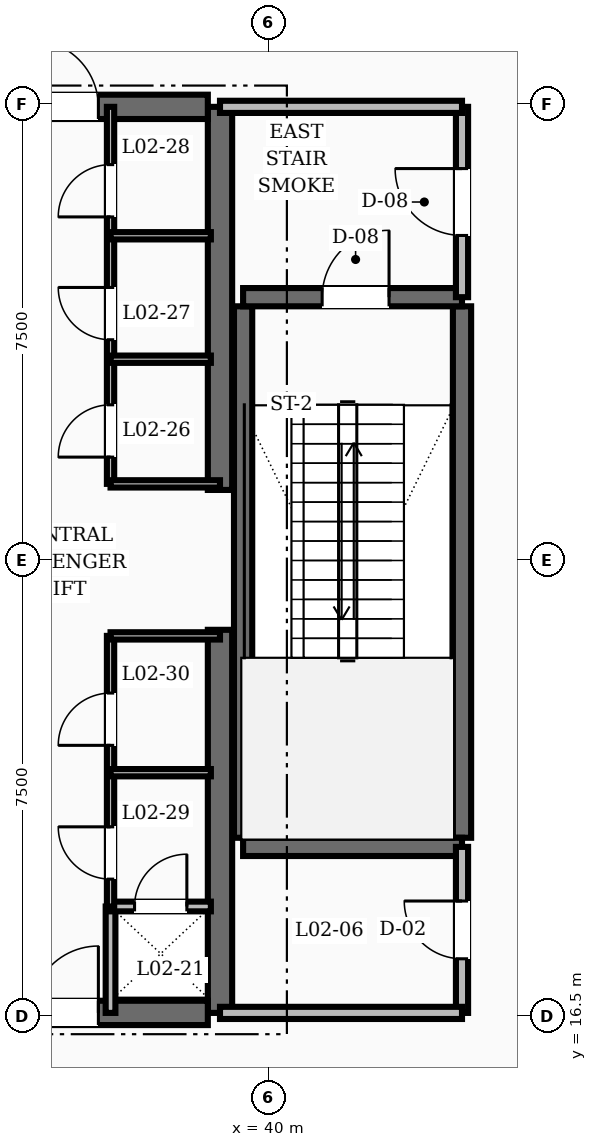
"""IFC4 building model, lengths in metres.
Left out: names, types, materials, properties, quantities, classifications, styles, units other than length and angle.
Written with IfcOpenShell. Run it as: python <this file> out.ifc"""

import sys

from ifc_helpers import new_model, si_unit, direction, frame, frame_2d, origin, place, context, subcontext, project, spatial, rectangle, extrude, element, fill, save


model = new_model("IFC4")
c1 = context("Model", 3, precision=1e-05, world=origin(), true_north=direction((0.0, 1.0)))
c2 = subcontext(c1, "Body", "Model", "MODEL_VIEW")
j1 = project(units=[si_unit("LENGTHUNIT", "METRE"), si_unit("PLANEANGLEUNIT", "RADIAN")], contexts=[c1])
p1 = place(None, origin())
s1 = spatial("IfcSite", under=j1, at=p1, CompositionType="ELEMENT")
p2 = place(p1, origin())
s2 = spatial("IfcBuilding", under=s1, at=p2, CompositionType="ELEMENT")
p3 = place(p2, frame((0.0, 0.0, 10.0)))
s3 = spatial("IfcBuildingStorey", under=s2, at=p3, CompositionType="ELEMENT", Elevation=10.0)
for number, where, z_axis, x_axis in (
    (1, (39.2, 16.55, 0.0), (0.0, 0.0, 1.0), (0.0, 1.0, 0.0)),
    (2, (39.2, 25.15, 0.0), (0.0, 0.0, 1.0), (0.0, 1.0, 0.0)),
):
    element("IfcWall", number, at=place(p3, frame(where, z_axis=z_axis, x_axis=x_axis)), inside=s3, PredefinedType="SHEAR", context=c2, shape_type="SweptSolid", body=[
        extrude(rectangle(XDim=6.3, YDim=0.4, at=frame_2d((3.15, 0.0))), origin(), (0.0, 0.0, 1.0), 4.8),
    ])
p4 = place(p3, frame((35.8, 16.55, 0.0), z_axis=(0.0, 0.0, 1.0), x_axis=(1.0, 0.0, 0.0)))
e3 = element("IfcWall", 3, at=p4, inside=s3, PredefinedType="SHEAR", context=c2, shape_type="SweptSolid", body=[
    extrude(rectangle(XDim=3.2, YDim=0.4, at=frame_2d((1.6, 0.0))), origin(), (0.0, 0.0, 1.0), 4.8),
])
p5 = place(p4, frame((0.3, 0.0, 0.0)))
e4 = element("IfcOpeningElement", 4, at=p5, cuts=e3, PredefinedType="OPENING", context=c2, shape_type="SweptSolid", body=[
    extrude(rectangle(XDim=1.1, YDim=2.1, at=frame_2d((0.55, 1.05))), frame((0.0, 0.21, 0.0), z_axis=(0.0, -1.0, 0.0), x_axis=(1.0, 0.0, 0.0)), (0.0, 0.0, 1.0), 0.42),
])
p6 = place(p3, frame((35.8, 31.45, 0.0), z_axis=(0.0, 0.0, 1.0), x_axis=(1.0, 0.0, 0.0)))
e5 = element("IfcWall", 5, at=p6, inside=s3, PredefinedType="SHEAR", context=c2, shape_type="SweptSolid", body=[
    extrude(rectangle(XDim=3.2, YDim=0.4, at=frame_2d((1.6, 0.0))), origin(), (0.0, 0.0, 1.0), 4.8),
])
p7 = place(p6, frame((0.3, 0.0, 0.0)))
e6 = element("IfcOpeningElement", 6, at=p7, cuts=e5, PredefinedType="OPENING", context=c2, shape_type="SweptSolid", body=[
    extrude(rectangle(XDim=1.1, YDim=2.1, at=frame_2d((0.55, 1.05))), frame((0.0, 0.21, 0.0), z_axis=(0.0, -1.0, 0.0), x_axis=(1.0, 0.0, 0.0)), (0.0, 0.0, 1.0), 0.42),
])
for number, where, z_axis, x_axis in (
    (7, (43.18, 19.43, 0.0), (0.0, 0.0, 1.0), (0.0, 1.0, 0.0)),
    (8, (39.58, 19.43, 0.0), (0.0, 0.0, 1.0), (0.0, 1.0, 0.0)),
):
    element("IfcWall", number, at=place(p3, frame(where, z_axis=z_axis, x_axis=x_axis)), inside=s3, PredefinedType="SHEAR", context=c2, shape_type="SweptSolid", body=[
        extrude(rectangle(XDim=8.74, YDim=0.3, at=frame_2d((4.37, 0.0))), origin(), (0.0, 0.0, 1.0), 4.8),
    ])
p8 = place(p3, frame((39.58, 19.28, 0.0), z_axis=(0.0, 0.0, 1.0), x_axis=(1.0, 0.0, 0.0)))
e9 = element("IfcWall", 9, at=p8, inside=s3, PredefinedType="SHEAR", context=c2, shape_type="SweptSolid", body=[
    extrude(rectangle(XDim=3.6, YDim=0.3, at=frame_2d((1.8, 0.0))), origin(), (0.0, 0.0, 1.0), 4.8),
])
p9 = place(p3, frame((39.58, 28.32, 0.0), z_axis=(0.0, 0.0, 1.0), x_axis=(1.0, 0.0, 0.0)))
e10 = element("IfcWall", 10, at=p9, inside=s3, PredefinedType="SHEAR", context=c2, shape_type="SweptSolid", body=[
    extrude(rectangle(XDim=3.6, YDim=0.3, at=frame_2d((1.8, 0.0))), origin(), (0.0, 0.0, 1.0), 4.8),
])
p10 = place(p9, frame((1.3, 0.0, 0.0)))
e11 = element("IfcOpeningElement", 11, at=p10, cuts=e10, PredefinedType="OPENING", context=c2, shape_type="SweptSolid", body=[
    extrude(rectangle(XDim=1.1, YDim=2.1, at=frame_2d((0.55, 1.05))), frame((0.0, 0.16, 0.0), z_axis=(0.0, -1.0, 0.0), x_axis=(1.0, 0.0, 0.0)), (0.0, 0.0, 1.0), 0.32),
])
p11 = place(p3, frame((43.18, 28.32, 0.0), z_axis=(0.0, 0.0, 1.0), x_axis=(0.0, 1.0, 0.0)))
e12 = element("IfcWall", 12, at=p11, inside=s3, PredefinedType="SOLIDWALL", context=c2, shape_type="SweptSolid", body=[
    extrude(rectangle(XDim=3.13, YDim=0.2, at=frame_2d((1.565, 0.0))), origin(), (0.0, 0.0, 1.0), 3.52),
])
p12 = place(p11, frame((1.015, 0.0, 0.0)))
e13 = element("IfcOpeningElement", 13, at=p12, cuts=e12, PredefinedType="OPENING", context=c2, shape_type="SweptSolid", body=[
    extrude(rectangle(XDim=1.1, YDim=2.1, at=frame_2d((0.55, 1.05))), frame((0.0, 0.11, 0.0), z_axis=(0.0, -1.0, 0.0), x_axis=(1.0, 0.0, 0.0)), (0.0, 0.0, 1.0), 0.22),
])
p13 = place(p3, frame((39.2, 31.45, 0.0), z_axis=(0.0, 0.0, 1.0), x_axis=(1.0, 0.0, 0.0)))
e14 = element("IfcWall", 14, at=p13, inside=s3, PredefinedType="SOLIDWALL", context=c2, shape_type="SweptSolid", body=[
    extrude(rectangle(XDim=3.98, YDim=0.2, at=frame_2d((1.99, 0.0))), origin(), (0.0, 0.0, 1.0), 3.52),
])
p14 = place(p3, frame((43.18, 16.55, 0.0), z_axis=(0.0, 0.0, 1.0), x_axis=(0.0, 1.0, 0.0)))
e15 = element("IfcWall", 15, at=p14, inside=s3, PredefinedType="SOLIDWALL", context=c2, shape_type="SweptSolid", body=[
    extrude(rectangle(XDim=2.73, YDim=0.2, at=frame_2d((1.365, 0.0))), origin(), (0.0, 0.0, 1.0), 3.52),
])
p15 = place(p14, frame((0.89, 0.0, 0.0)))
e16 = element("IfcOpeningElement", 16, at=p15, cuts=e15, PredefinedType="OPENING", context=c2, shape_type="SweptSolid", body=[
    extrude(rectangle(XDim=0.95, YDim=2.1, at=frame_2d((0.475, 1.05))), frame((0.0, 0.11, 0.0), z_axis=(0.0, -1.0, 0.0), x_axis=(1.0, 0.0, 0.0)), (0.0, 0.0, 1.0), 0.22),
])
p16 = place(p3, frame((39.2, 16.55, 0.0), z_axis=(0.0, 0.0, 1.0), x_axis=(1.0, 0.0, 0.0)))
e17 = element("IfcWall", 17, at=p16, inside=s3, PredefinedType="SOLIDWALL", context=c2, shape_type="SweptSolid", body=[
    extrude(rectangle(XDim=3.98, YDim=0.2, at=frame_2d((1.99, 0.0))), origin(), (0.0, 0.0, 1.0), 3.52),
])
p17 = place(p3, frame((37.4, 16.55, 0.0), z_axis=(0.0, 0.0, 1.0), x_axis=(0.0, 1.0, 0.0)))
e18 = element("IfcWall", 18, at=p17, inside=s3, PredefinedType="SOLIDWALL", context=c2, shape_type="SweptSolid", body=[
    extrude(rectangle(XDim=1.75, YDim=0.16, at=frame_2d((0.875, 0.0))), origin(), (0.0, 0.0, 1.0), 3.52),
])
p18 = place(p3, frame((37.4, 18.3, 0.0), z_axis=(0.0, 0.0, 1.0), x_axis=(1.0, 0.0, 0.0)))
e19 = element("IfcWall", 19, at=p18, inside=s3, PredefinedType="SOLIDWALL", context=c2, shape_type="SweptSolid", body=[
    extrude(rectangle(XDim=1.65, YDim=0.16, at=frame_2d((0.825, 0.0))), origin(), (0.0, 0.0, 1.0), 3.52),
])
p19 = place(p18, frame((0.395, 0.0, 0.0)))
e20 = element("IfcOpeningElement", 20, at=p19, cuts=e19, PredefinedType="OPENING", context=c2, shape_type="SweptSolid", body=[
    extrude(rectangle(XDim=0.86, YDim=2.1, at=frame_2d((0.43, 1.05))), frame((0.0, 0.09, 0.0), z_axis=(0.0, -1.0, 0.0), x_axis=(1.0, 0.0, 0.0)), (0.0, 0.0, 1.0), 0.18),
])
p20 = place(p3, frame((37.4, 25.25, 0.0), z_axis=(0.0, 0.0, 1.0), x_axis=(0.0, 1.0, 0.0)))
e21 = element("IfcWall", 21, at=p20, inside=s3, PredefinedType="PARTITIONING", context=c2, shape_type="SweptSolid", body=[
    extrude(rectangle(XDim=6.2, YDim=0.12, at=frame_2d((3.1, 0.0))), origin(), (0.0, 0.0, 1.0), 3.52),
])
p21 = place(p20, frame((0.44, 0.0, 0.0)))
e22 = element("IfcOpeningElement", 22, at=p21, cuts=e21, PredefinedType="OPENING", context=c2, shape_type="SweptSolid", body=[
    extrude(rectangle(XDim=0.86, YDim=2.1, at=frame_2d((0.43, 1.05))), frame((0.0, 0.07, 0.0), z_axis=(0.0, -1.0, 0.0), x_axis=(1.0, 0.0, 0.0)), (0.0, 0.0, 1.0), 0.14),
])
p22 = place(p20, frame((2.37, 0.0, 0.0)))
e23 = element("IfcOpeningElement", 23, at=p22, cuts=e21, PredefinedType="OPENING", context=c2, shape_type="SweptSolid", body=[
    extrude(rectangle(XDim=0.86, YDim=2.1, at=frame_2d((0.43, 1.05))), frame((0.0, 0.07, 0.0), z_axis=(0.0, -1.0, 0.0), x_axis=(1.0, 0.0, 0.0)), (0.0, 0.0, 1.0), 0.14),
])
p23 = place(p20, frame((4.39, 0.0, 0.0)))
e24 = element("IfcOpeningElement", 24, at=p23, cuts=e21, PredefinedType="OPENING", context=c2, shape_type="SweptSolid", body=[
    extrude(rectangle(XDim=0.86, YDim=2.1, at=frame_2d((0.43, 1.05))), frame((0.0, 0.07, 0.0), z_axis=(0.0, -1.0, 0.0), x_axis=(1.0, 0.0, 0.0)), (0.0, 0.0, 1.0), 0.14),
])
p24 = place(p3, frame((37.4, 25.25, 0.0), z_axis=(0.0, 0.0, 1.0), x_axis=(1.0, 0.0, 0.0)))
e25 = element("IfcWall", 25, at=p24, inside=s3, PredefinedType="PARTITIONING", context=c2, shape_type="SweptSolid", body=[
    extrude(rectangle(XDim=1.8, YDim=0.12, at=frame_2d((0.9, 0.0))), origin(), (0.0, 0.0, 1.0), 3.52),
])
p25 = place(p3, frame((37.4, 18.3, 0.0), z_axis=(0.0, 0.0, 1.0), x_axis=(0.0, 1.0, 0.0)))
e26 = element("IfcWall", 26, at=p25, inside=s3, PredefinedType="PARTITIONING", context=c2, shape_type="SweptSolid", body=[
    extrude(rectangle(XDim=4.45, YDim=0.12, at=frame_2d((2.225, 0.0))), origin(), (0.0, 0.0, 1.0), 3.52),
])
p26 = place(p25, frame((0.45, 0.0, 0.0)))
e27 = element("IfcOpeningElement", 27, at=p26, cuts=e26, PredefinedType="OPENING", context=c2, shape_type="SweptSolid", body=[
    extrude(rectangle(XDim=0.86, YDim=2.1, at=frame_2d((0.43, 1.05))), frame((0.0, 0.07, 0.0), z_axis=(0.0, -1.0, 0.0), x_axis=(1.0, 0.0, 0.0)), (0.0, 0.0, 1.0), 0.14),
])
p27 = place(p25, frame((2.65, 0.0, 0.0)))
e28 = element("IfcOpeningElement", 28, at=p27, cuts=e26, PredefinedType="OPENING", context=c2, shape_type="SweptSolid", body=[
    extrude(rectangle(XDim=0.86, YDim=2.1, at=frame_2d((0.43, 1.05))), frame((0.0, 0.07, 0.0), z_axis=(0.0, -1.0, 0.0), x_axis=(1.0, 0.0, 0.0)), (0.0, 0.0, 1.0), 0.14),
])
p28 = place(p3, frame((37.4, 22.75, 0.0), z_axis=(0.0, 0.0, 1.0), x_axis=(1.0, 0.0, 0.0)))
e29 = element("IfcWall", 29, at=p28, inside=s3, PredefinedType="PARTITIONING", context=c2, shape_type="SweptSolid", body=[
    extrude(rectangle(XDim=1.8, YDim=0.12, at=frame_2d((0.9, 0.0))), origin(), (0.0, 0.0, 1.0), 3.52),
])
for number, where, z_axis, x_axis in (
    (30, (37.4, 27.3, 0.0), (0.0, 0.0, 1.0), (1.0, 0.0, 0.0)),
    (31, (37.4, 29.33, 0.0), (0.0, 0.0, 1.0), (1.0, 0.0, 0.0)),
    (32, (37.4, 20.5, 0.0), (0.0, 0.0, 1.0), (1.0, 0.0, 0.0)),
):
    element("IfcWall", number, at=place(p3, frame(where, z_axis=z_axis, x_axis=x_axis)), inside=s3, PredefinedType="PARTITIONING", context=c2, shape_type="SweptSolid", body=[
        extrude(rectangle(XDim=1.65, YDim=0.12, at=frame_2d((0.825, 0.0))), origin(), (0.0, 0.0, 1.0), 3.52),
    ])
p29 = place(p10, origin())
e33 = element("IfcDoor", 33, at=p29, inside=s3, OperationType="SINGLE_SWING_RIGHT", PredefinedType="DOOR", context=c2, shape_type="SweptSolid", body=[
    extrude(rectangle(XDim=1.1, YDim=2.1, at=frame_2d((0.55, 1.05))), frame((0.0, 0.025, 0.0), z_axis=(0.0, -1.0, 0.0), x_axis=(1.0, 0.0, 0.0)), (0.0, 0.0, 1.0), 0.05),
])
fill(e11, e33)
p30 = place(p12, origin())
e34 = element("IfcDoor", 34, at=p30, inside=s3, OperationType="SINGLE_SWING_RIGHT", PredefinedType="DOOR", context=c2, shape_type="SweptSolid", body=[
    extrude(rectangle(XDim=1.1, YDim=2.1, at=frame_2d((0.55, 1.05))), frame((0.0, 0.025, 0.0), z_axis=(0.0, -1.0, 0.0), x_axis=(1.0, 0.0, 0.0)), (0.0, 0.0, 1.0), 0.05),
])
fill(e13, e34)
p31 = place(p15, origin())
e35 = element("IfcDoor", 35, at=p31, inside=s3, OperationType="SINGLE_SWING_RIGHT", PredefinedType="DOOR", context=c2, shape_type="SweptSolid", body=[
    extrude(rectangle(XDim=0.95, YDim=2.1, at=frame_2d((0.475, 1.05))), frame((0.0, 0.025, 0.0), z_axis=(0.0, -1.0, 0.0), x_axis=(1.0, 0.0, 0.0)), (0.0, 0.0, 1.0), 0.05),
])
fill(e16, e35)
p32 = place(p7, origin())
e36 = element("IfcDoor", 36, at=p32, inside=s3, OperationType="SINGLE_SWING_LEFT", PredefinedType="DOOR", context=c2, shape_type="SweptSolid", body=[
    extrude(rectangle(XDim=1.1, YDim=2.1, at=frame_2d((0.55, 1.05))), frame((0.0, 0.025, 0.0), z_axis=(0.0, -1.0, 0.0), x_axis=(1.0, 0.0, 0.0)), (0.0, 0.0, 1.0), 0.05),
])
fill(e6, e36)
p33 = place(p5, origin())
e37 = element("IfcDoor", 37, at=p33, inside=s3, OperationType="SINGLE_SWING_RIGHT", PredefinedType="DOOR", context=c2, shape_type="SweptSolid", body=[
    extrude(rectangle(XDim=1.1, YDim=2.1, at=frame_2d((0.55, 1.05))), frame((0.0, 0.025, 0.0), z_axis=(0.0, -1.0, 0.0), x_axis=(1.0, 0.0, 0.0)), (0.0, 0.0, 1.0), 0.05),
])
fill(e4, e37)
p34 = place(p19, origin())
e38 = element("IfcDoor", 38, at=p34, inside=s3, OperationType="SINGLE_SWING_RIGHT", PredefinedType="TRAPDOOR", context=c2, shape_type="SweptSolid", body=[
    extrude(rectangle(XDim=0.86, YDim=2.1, at=frame_2d((0.43, 1.05))), frame((0.0, 0.025, 0.0), z_axis=(0.0, -1.0, 0.0), x_axis=(1.0, 0.0, 0.0)), (0.0, 0.0, 1.0), 0.05),
])
fill(e20, e38)
p35 = place(p21, origin())
e39 = element("IfcDoor", 39, at=p35, inside=s3, OperationType="SINGLE_SWING_LEFT", PredefinedType="DOOR", context=c2, shape_type="SweptSolid", body=[
    extrude(rectangle(XDim=0.86, YDim=2.1, at=frame_2d((0.43, 1.05))), frame((0.0, 0.025, 0.0), z_axis=(0.0, -1.0, 0.0), x_axis=(1.0, 0.0, 0.0)), (0.0, 0.0, 1.0), 0.05),
])
fill(e22, e39)
p36 = place(p22, origin())
e40 = element("IfcDoor", 40, at=p36, inside=s3, OperationType="SINGLE_SWING_RIGHT", PredefinedType="DOOR", context=c2, shape_type="SweptSolid", body=[
    extrude(rectangle(XDim=0.86, YDim=2.1, at=frame_2d((0.43, 1.05))), frame((0.0, 0.025, 0.0), z_axis=(0.0, -1.0, 0.0), x_axis=(1.0, 0.0, 0.0)), (0.0, 0.0, 1.0), 0.05),
])
fill(e23, e40)
p37 = place(p23, origin())
e41 = element("IfcDoor", 41, at=p37, inside=s3, OperationType="SINGLE_SWING_LEFT", PredefinedType="DOOR", context=c2, shape_type="SweptSolid", body=[
    extrude(rectangle(XDim=0.86, YDim=2.1, at=frame_2d((0.43, 1.05))), frame((0.0, 0.025, 0.0), z_axis=(0.0, -1.0, 0.0), x_axis=(1.0, 0.0, 0.0)), (0.0, 0.0, 1.0), 0.05),
])
fill(e24, e41)
p38 = place(p26, origin())
e42 = element("IfcDoor", 42, at=p38, inside=s3, OperationType="SINGLE_SWING_RIGHT", PredefinedType="DOOR", context=c2, shape_type="SweptSolid", body=[
    extrude(rectangle(XDim=0.86, YDim=2.1, at=frame_2d((0.43, 1.05))), frame((0.0, 0.025, 0.0), z_axis=(0.0, -1.0, 0.0), x_axis=(1.0, 0.0, 0.0)), (0.0, 0.0, 1.0), 0.05),
])
fill(e27, e42)
p39 = place(p27, origin())
e43 = element("IfcDoor", 43, at=p39, inside=s3, OperationType="SINGLE_SWING_LEFT", PredefinedType="DOOR", context=c2, shape_type="SweptSolid", body=[
    extrude(rectangle(XDim=0.86, YDim=2.1, at=frame_2d((0.43, 1.05))), frame((0.0, 0.025, 0.0), z_axis=(0.0, -1.0, 0.0), x_axis=(1.0, 0.0, 0.0)), (0.0, 0.0, 1.0), 0.05),
])
fill(e28, e43)
save(model, sys.argv[1])
